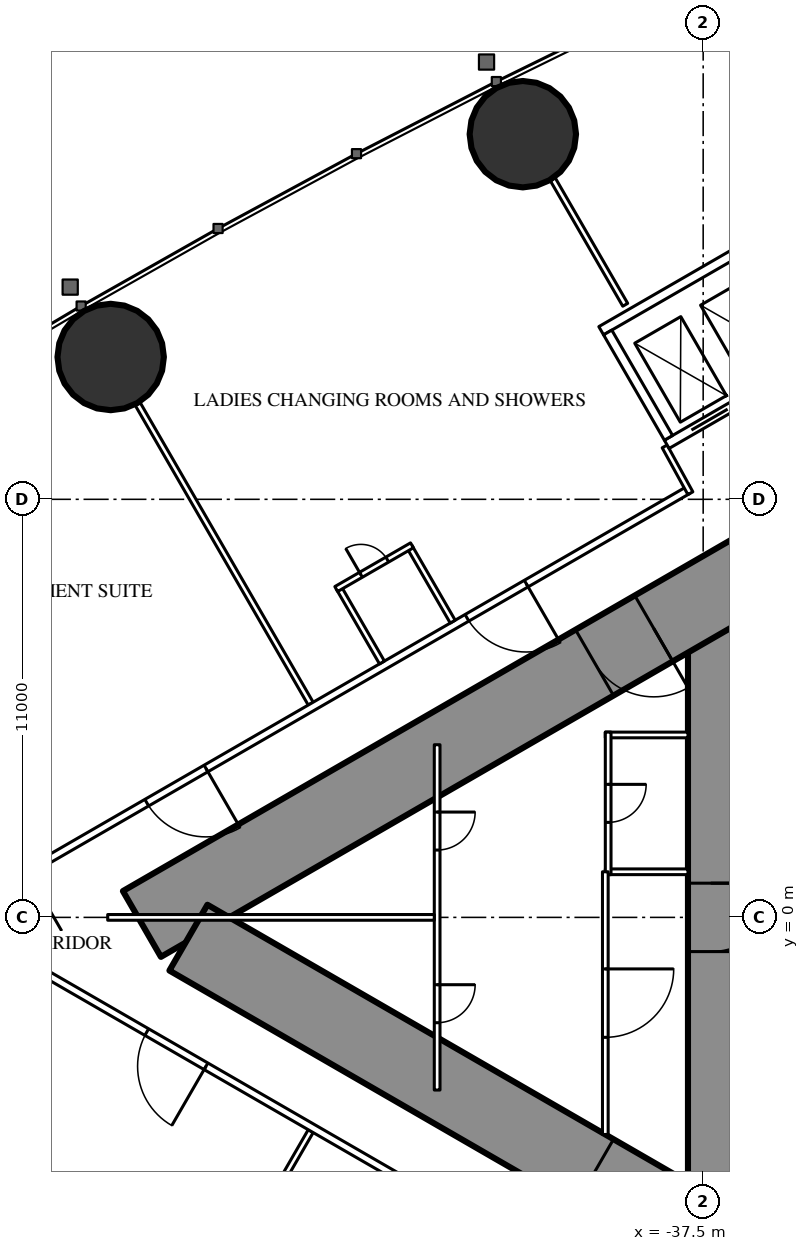
"""IFC4 building model, lengths in metres.
Left out: names, types, materials, properties, quantities, classifications, styles, units other than length and angle.
Written with IfcOpenShell. Run it as: python <this file> out.ifc"""

import sys

from ifc_helpers import new_model, si_unit, direction, frame, frame_2d, origin, origin_2d, place, context, subcontext, project, spatial, rectangle, hollow_circle, extrude, element, fill, save


model = new_model("IFC4")
c1 = context("Model", 3, precision=1e-05, world=origin(), true_north=direction((0.0, 1.0)))
c2 = subcontext(c1, "Body", "Model", "MODEL_VIEW")
j1 = project(units=[si_unit("LENGTHUNIT", "METRE"), si_unit("PLANEANGLEUNIT", "RADIAN")], contexts=[c1])
p1 = place(None, origin())
s1 = spatial("IfcSite", under=j1, at=p1, CompositionType="ELEMENT")
p2 = place(p1, origin())
s2 = spatial("IfcBuilding", under=s1, at=p2, CompositionType="ELEMENT")
p3 = place(p2, frame((0.0, 0.0, 12.6)))
s3 = spatial("IfcBuildingStorey", under=s2, at=p3, CompositionType="ELEMENT", Elevation=12.6)
for number, where, z_axis, x_axis in (
    (1, (-42.245, 20.607, 0.0), (0.0, 0.0, 1.0), (1.0, 0.0, 0.0)),
    (2, (-53.09, 14.745, 0.0), (0.0, 0.0, 1.0), (1.0, 0.0, 0.0)),
):
    element("IfcColumn", number, at=place(p3, frame(where, z_axis=z_axis, x_axis=x_axis)), inside=s3, PredefinedType="COLUMN", context=c2, shape_type="SweptSolid", body=[
        extrude(hollow_circle(Radius=1.4, WallThickness=0.12, at=origin_2d()), origin(), (0.0, 0.0, 1.0), 5.4),
    ])
p4 = place(p3, frame((-37.3, 8.6, 0.0), z_axis=(0.0, 0.0, 1.0), x_axis=(0.0, -1.0, 0.0)))
e3 = element("IfcWall", 3, at=p4, inside=s3, PredefinedType="SHEAR", context=c2, shape_type="SweptSolid", body=[
    extrude(rectangle(XDim=17.2, YDim=1.2, at=frame_2d((8.6, 0.0))), origin(), (0.0, 0.0, 1.0), 5.4),
])
p5 = place(p4, frame((7.7, 0.0, 0.0)))
e4 = element("IfcOpeningElement", 4, at=p5, cuts=e3, PredefinedType="OPENING", context=c2, shape_type="SweptSolid", body=[
    extrude(rectangle(XDim=1.8, YDim=2.2, at=frame_2d((0.9, 1.1))), frame((0.0, 0.61, 0.0), z_axis=(0.0, -1.0, 0.0), x_axis=(1.0, 0.0, 0.0)), (0.0, 0.0, 1.0), 1.22),
])
p6 = place(p3, frame((-27.2, 14.3, 0.0), z_axis=(0.0, 0.0, 1.0), x_axis=(-0.866026593062, -0.499997940104, 0.0)))
e5 = element("IfcWall", 5, at=p6, inside=s3, PredefinedType="SHEAR", context=c2, shape_type="SweptSolid", body=[
    extrude(rectangle(XDim=28.946, YDim=2.0, at=frame_2d((14.473, 0.0))), origin(), (0.0, 0.0, 1.0), 5.4),
])
p7 = place(p6, frame((4.6, 0.0, 0.0)))
e6 = element("IfcOpeningElement", 6, at=p7, cuts=e5, PredefinedType="OPENING", context=c2, shape_type="SweptSolid", body=[
    extrude(rectangle(XDim=1.0, YDim=2.2, at=frame_2d((0.5, 1.1))), frame((0.0, 1.01, 0.0), z_axis=(0.0, -1.0, 0.0), x_axis=(1.0, 0.0, 0.0)), (0.0, 0.0, 1.0), 2.02),
])
p8 = place(p6, frame((13.395, 0.0, 0.0)))
e7 = element("IfcOpeningElement", 7, at=p8, cuts=e5, PredefinedType="OPENING", context=c2, shape_type="SweptSolid", body=[
    extrude(rectangle(XDim=1.8, YDim=2.2, at=frame_2d((0.9, 1.1))), frame((0.0, 1.01, 0.0), z_axis=(0.0, -1.0, 0.0), x_axis=(1.0, 0.0, 0.0)), (0.0, 0.0, 1.0), 2.02),
])
p9 = place(p3, frame((-27.2, -14.3, 0.0), z_axis=(0.0, 0.0, 1.0), x_axis=(-0.866024044937, 0.500002353585, 0.0)))
e8 = element("IfcWall", 8, at=p9, inside=s3, PredefinedType="SHEAR", context=c2, shape_type="SweptSolid", body=[
    extrude(rectangle(XDim=27.533, YDim=2.0, at=frame_2d((13.767, 0.0))), origin(), (0.0, 0.0, 1.0), 5.4),
])
p10 = place(p9, frame((4.6, 0.0, 0.0)))
e9 = element("IfcOpeningElement", 9, at=p10, cuts=e8, PredefinedType="OPENING", context=c2, shape_type="SweptSolid", body=[
    extrude(rectangle(XDim=1.0, YDim=2.2, at=frame_2d((0.5, 1.1))), frame((0.0, 1.01, 0.0), z_axis=(0.0, -1.0, 0.0), x_axis=(1.0, 0.0, 0.0)), (0.0, 0.0, 1.0), 2.02),
])
p11 = place(p9, frame((13.395, 0.0, 0.0)))
e10 = element("IfcOpeningElement", 10, at=p11, cuts=e8, PredefinedType="OPENING", context=c2, shape_type="SweptSolid", body=[
    extrude(rectangle(XDim=1.8, YDim=2.2, at=frame_2d((0.9, 1.1))), frame((0.0, 1.01, 0.0), z_axis=(0.0, -1.0, 0.0), x_axis=(1.0, 0.0, 0.0)), (0.0, 0.0, 1.0), 2.02),
])
for number, where, z_axis, x_axis in (
    (11, (-47.827, 5.624, 0.0), (0.0, 0.0, 1.0), (-0.5, 0.866, 0.0)),
    (12, (-47.827, -5.624, 0.0), (0.0, 0.0, 1.0), (-0.5, -0.866, 0.0)),
):
    element("IfcWall", number, at=place(p3, frame(where, z_axis=z_axis, x_axis=x_axis)), inside=s3, PredefinedType="PARTITIONING", context=c2, shape_type="SweptSolid", body=[
        extrude(rectangle(XDim=9.11, YDim=0.15, at=frame_2d((4.555, 0.0))), origin(), (0.0, 0.0, 1.0), 4.15),
    ])
p12 = place(p3, frame((-39.551, 16.119, 0.0), z_axis=(0.0, 0.0, 1.0), x_axis=(-0.500014214979, 0.866017196607, 0.0)))
e13 = element("IfcWall", 13, at=p12, inside=s3, PredefinedType="PARTITIONING", context=c2, shape_type="SweptSolid", body=[
    extrude(rectangle(XDim=3.815, YDim=0.15, at=frame_2d((1.907, 0.0))), origin(), (0.0, 0.0, 1.0), 5.15),
])
p13 = place(p3, frame((-37.9, 11.24, 0.0), z_axis=(0.0, 0.0, 1.0), x_axis=(-0.866022995118, -0.50000417191, 0.0)))
e14 = element("IfcWall", 14, at=p13, inside=s3, PredefinedType="PARTITIONING", context=c2, shape_type="SweptSolid", body=[
    extrude(rectangle(XDim=22.48, YDim=0.2, at=frame_2d((11.24, 0.0))), origin(), (0.0, 0.0, 1.0), 4.25),
])
p14 = place(p13, frame((14.644, 0.0, 0.0)))
e15 = element("IfcOpeningElement", 15, at=p14, cuts=e14, PredefinedType="OPENING", context=c2, shape_type="SweptSolid", body=[
    extrude(rectangle(XDim=1.8, YDim=2.2, at=frame_2d((0.9, 1.1))), frame((0.0, 0.11, 0.0), z_axis=(0.0, -1.0, 0.0), x_axis=(1.0, 0.0, 0.0)), (0.0, 0.0, 1.0), 0.22),
])
p15 = place(p13, frame((20.069, 0.0, 0.0)))
e16 = element("IfcOpeningElement", 16, at=p15, cuts=e14, PredefinedType="OPENING", context=c2, shape_type="SweptSolid", body=[
    extrude(rectangle(XDim=1.8, YDim=2.2, at=frame_2d((0.9, 1.1))), frame((0.0, 0.11, 0.0), z_axis=(0.0, -1.0, 0.0), x_axis=(1.0, 0.0, 0.0)), (0.0, 0.0, 1.0), 0.22),
])
p16 = place(p13, frame((4.915, 0.0, 0.0)))
e17 = element("IfcOpeningElement", 17, at=p16, cuts=e14, PredefinedType="OPENING", context=c2, shape_type="SweptSolid", body=[
    extrude(rectangle(XDim=1.8, YDim=2.2, at=frame_2d((0.9, 1.1))), frame((0.0, 0.11, 0.0), z_axis=(0.0, -1.0, 0.0), x_axis=(1.0, 0.0, 0.0)), (0.0, 0.0, 1.0), 0.22),
])
p17 = place(p3, frame((-37.12, -11.69, 0.0), z_axis=(0.0, 0.0, 1.0), x_axis=(-0.866028803602, 0.499994111297, 0.0)))
e18 = element("IfcWall", 18, at=p17, inside=s3, PredefinedType="PARTITIONING", context=c2, shape_type="SweptSolid", body=[
    extrude(rectangle(XDim=23.26, YDim=0.2, at=frame_2d((11.63, 0.0))), origin(), (0.0, 0.0, 1.0), 4.25),
])
p18 = place(p17, frame((20.909, 0.0, 0.0)))
e19 = element("IfcOpeningElement", 19, at=p18, cuts=e18, PredefinedType="OPENING", context=c2, shape_type="SweptSolid", body=[
    extrude(rectangle(XDim=1.8, YDim=2.2, at=frame_2d((0.9, 1.1))), frame((0.0, 0.11, 0.0), z_axis=(0.0, -1.0, 0.0), x_axis=(1.0, 0.0, 0.0)), (0.0, 0.0, 1.0), 0.22),
])
p19 = place(p17, frame((15.544, 0.0, 0.0)))
e20 = element("IfcOpeningElement", 20, at=p19, cuts=e18, PredefinedType="OPENING", context=c2, shape_type="SweptSolid", body=[
    extrude(rectangle(XDim=1.8, YDim=2.2, at=frame_2d((0.9, 1.1))), frame((0.0, 0.11, 0.0), z_axis=(0.0, -1.0, 0.0), x_axis=(1.0, 0.0, 0.0)), (0.0, 0.0, 1.0), 0.22),
])
p20 = place(p17, frame((5.365, 0.0, 0.0)))
e21 = element("IfcOpeningElement", 21, at=p20, cuts=e18, PredefinedType="OPENING", context=c2, shape_type="SweptSolid", body=[
    extrude(rectangle(XDim=1.8, YDim=2.2, at=frame_2d((0.9, 1.1))), frame((0.0, 0.11, 0.0), z_axis=(0.0, -1.0, 0.0), x_axis=(1.0, 0.0, 0.0)), (0.0, 0.0, 1.0), 0.22),
])
p21 = place(p3, frame((-38.513, 12.392, 0.0), z_axis=(0.0, 0.0, 1.0), x_axis=(0.481358300093, -0.876523922624, 0.0)))
e22 = element("IfcWall", 22, at=p21, inside=s3, PredefinedType="PARTITIONING", context=c2, shape_type="SweptSolid", body=[
    extrude(rectangle(XDim=1.405, YDim=0.15, at=frame_2d((0.703, 0.0))), origin(), (0.0, 0.0, 1.0), 5.15),
])
for number, where, z_axis, x_axis in (
    (23, (-37.9, 1.2, 0.0), (0.0, 0.0, 1.0), (-1.0, 0.0, 0.0)),
    (24, (-37.9, 4.8, 0.0), (0.0, 0.0, 1.0), (-1.0, 0.0, 0.0)),
):
    element("IfcWall", number, at=place(p3, frame(where, z_axis=z_axis, x_axis=x_axis)), inside=s3, PredefinedType="PARTITIONING", context=c2, shape_type="SweptSolid", body=[
        extrude(rectangle(XDim=2.175, YDim=0.15, at=frame_2d((1.087, 0.0))), origin(), (0.0, 0.0, 1.0), 5.15),
    ])
p22 = place(p3, frame((-40.0, 4.875, 0.0), z_axis=(0.0, 0.0, 1.0), x_axis=(0.0, -1.0, 0.0)))
e25 = element("IfcWall", 25, at=p22, inside=s3, PredefinedType="PARTITIONING", context=c2, shape_type="SweptSolid", body=[
    extrude(rectangle(XDim=3.75, YDim=0.15, at=frame_2d((1.875, 0.0))), origin(), (0.0, 0.0, 1.0), 5.15),
])
p23 = place(p22, frame((1.375, 0.0, 0.0)))
e26 = element("IfcOpeningElement", 26, at=p23, cuts=e25, PredefinedType="OPENING", context=c2, shape_type="SweptSolid", body=[
    extrude(rectangle(XDim=1.0, YDim=2.2, at=frame_2d((0.5, 1.1))), frame((0.0, 0.085, 0.0), z_axis=(0.0, -1.0, 0.0), x_axis=(1.0, 0.0, 0.0)), (0.0, 0.0, 1.0), 0.17),
])
p24 = place(p3, frame((-40.075, 1.2, 0.0), z_axis=(0.0, 0.0, 1.0), x_axis=(0.0, -1.0, 0.0)))
e27 = element("IfcWall", 27, at=p24, inside=s3, PredefinedType="PARTITIONING", context=c2, shape_type="SweptSolid", body=[
    extrude(rectangle(XDim=6.912, YDim=0.15, at=frame_2d((3.456, 0.0))), origin(), (0.0, 0.0, 1.0), 5.15),
])
p25 = place(p24, frame((2.556, 0.0, 0.0)))
e28 = element("IfcOpeningElement", 28, at=p25, cuts=e27, PredefinedType="OPENING", context=c2, shape_type="SweptSolid", body=[
    extrude(rectangle(XDim=1.8, YDim=2.2, at=frame_2d((0.9, 1.1))), frame((0.0, 0.085, 0.0), z_axis=(0.0, -1.0, 0.0), x_axis=(1.0, 0.0, 0.0)), (0.0, 0.0, 1.0), 0.17),
])
p26 = place(p3, frame((-44.5, 4.543, 0.0), z_axis=(0.0, 0.0, 1.0), x_axis=(0.0, -1.0, 0.0)))
e29 = element("IfcWall", 29, at=p26, inside=s3, PredefinedType="PARTITIONING", context=c2, shape_type="SweptSolid", body=[
    extrude(rectangle(XDim=9.085, YDim=0.15, at=frame_2d((4.543, 0.0))), origin(), (0.0, 0.0, 1.0), 5.15),
])
p27 = place(p26, frame((1.771, 0.0, 0.0)))
e30 = element("IfcOpeningElement", 30, at=p27, cuts=e29, PredefinedType="OPENING", context=c2, shape_type="SweptSolid", body=[
    extrude(rectangle(XDim=1.0, YDim=2.2, at=frame_2d((0.5, 1.1))), frame((0.0, 0.085, 0.0), z_axis=(0.0, -1.0, 0.0), x_axis=(1.0, 0.0, 0.0)), (0.0, 0.0, 1.0), 0.17),
])
p28 = place(p26, frame((6.314, 0.0, 0.0)))
e31 = element("IfcOpeningElement", 31, at=p28, cuts=e29, PredefinedType="OPENING", context=c2, shape_type="SweptSolid", body=[
    extrude(rectangle(XDim=1.0, YDim=2.2, at=frame_2d((0.5, 1.1))), frame((0.0, 0.085, 0.0), z_axis=(0.0, -1.0, 0.0), x_axis=(1.0, 0.0, 0.0)), (0.0, 0.0, 1.0), 0.17),
])
p29 = place(p3, frame((-44.575, 0.0, 0.0), z_axis=(0.0, 0.0, 1.0), x_axis=(-1.0, 0.0, 0.0)))
e32 = element("IfcWall", 32, at=p29, inside=s3, PredefinedType="PARTITIONING", context=c2, shape_type="SweptSolid", body=[
    extrude(rectangle(XDim=8.593, YDim=0.15, at=frame_2d((4.297, 0.0))), origin(), (0.0, 0.0, 1.0), 4.15),
])
p30 = place(p3, frame((-44.09, 7.782, 0.0), z_axis=(0.0, 0.0, 1.0), x_axis=(-0.499982560684, 0.866035472144, 0.0)))
e33 = element("IfcWall", 33, at=p30, inside=s3, PredefinedType="PARTITIONING", context=c2, shape_type="SweptSolid", body=[
    extrude(rectangle(XDim=2.275, YDim=0.15, at=frame_2d((1.137, 0.0))), origin(), (0.0, 0.0, 1.0), 5.15),
])
p31 = place(p3, frame((-45.952, 6.707, 0.0), z_axis=(0.0, 0.0, 1.0), x_axis=(-0.500063042646, 0.865989003036, 0.0)))
e34 = element("IfcWall", 34, at=p31, inside=s3, PredefinedType="PARTITIONING", context=c2, shape_type="SweptSolid", body=[
    extrude(rectangle(XDim=2.275, YDim=0.15, at=frame_2d((1.138, 0.0))), origin(), (0.0, 0.0, 1.0), 5.15),
])
p32 = place(p3, frame((-45.163, 9.789, 0.0), z_axis=(0.0, 0.0, 1.0), x_axis=(-0.866053019151, -0.499952165731, 0.0)))
e35 = element("IfcWall", 35, at=p32, inside=s3, PredefinedType="PARTITIONING", context=c2, shape_type="SweptSolid", body=[
    extrude(rectangle(XDim=2.3, YDim=0.15, at=frame_2d((1.15, 0.0))), origin(), (0.0, 0.0, 1.0), 5.15),
])
p33 = place(p32, frame((0.75, 0.0, 0.0)))
e36 = element("IfcOpeningElement", 36, at=p33, cuts=e35, PredefinedType="OPENING", context=c2, shape_type="SweptSolid", body=[
    extrude(rectangle(XDim=0.8, YDim=2.2, at=frame_2d((0.4, 1.1))), frame((0.0, 0.085, 0.0), z_axis=(0.0, -1.0, 0.0), x_axis=(1.0, 0.0, 0.0)), (0.0, 0.0, 1.0), 0.17),
])
p34 = place(p3, frame((-31.01, 16.747, 0.0), z_axis=(0.0, 0.0, 1.0), x_axis=(-0.866028165386, -0.499995216735, 0.0)))
e37 = element("IfcWall", 37, at=p34, inside=s3, PredefinedType="PARTITIONING", context=c2, shape_type="SweptSolid", body=[
    extrude(rectangle(XDim=8.6, YDim=0.25, at=frame_2d((4.3, 0.0))), origin(), (0.0, 0.0, 1.0), 5.15),
])
p35 = place(p34, frame((0.75, 0.0, 0.0)))
e38 = element("IfcOpeningElement", 38, at=p35, cuts=e37, PredefinedType="OPENING", context=c2, shape_type="SweptSolid", body=[
    extrude(rectangle(XDim=1.1, YDim=2.2, at=frame_2d((0.55, 1.1))), frame((0.0, 0.135, 0.0), z_axis=(0.0, -1.0, 0.0), x_axis=(1.0, 0.0, 0.0)), (0.0, 0.0, 1.0), 0.27),
])
p36 = place(p34, frame((2.75, 0.0, 0.0)))
e39 = element("IfcOpeningElement", 39, at=p36, cuts=e37, PredefinedType="OPENING", context=c2, shape_type="SweptSolid", body=[
    extrude(rectangle(XDim=1.1, YDim=2.2, at=frame_2d((0.55, 1.1))), frame((0.0, 0.135, 0.0), z_axis=(0.0, -1.0, 0.0), x_axis=(1.0, 0.0, 0.0)), (0.0, 0.0, 1.0), 0.27),
])
p37 = place(p34, frame((4.75, 0.0, 0.0)))
e40 = element("IfcOpeningElement", 40, at=p37, cuts=e37, PredefinedType="OPENING", context=c2, shape_type="SweptSolid", body=[
    extrude(rectangle(XDim=1.1, YDim=2.2, at=frame_2d((0.55, 1.1))), frame((0.0, 0.135, 0.0), z_axis=(0.0, -1.0, 0.0), x_axis=(1.0, 0.0, 0.0)), (0.0, 0.0, 1.0), 0.27),
])
p38 = place(p34, frame((6.75, 0.0, 0.0)))
e41 = element("IfcOpeningElement", 41, at=p38, cuts=e37, PredefinedType="OPENING", context=c2, shape_type="SweptSolid", body=[
    extrude(rectangle(XDim=1.1, YDim=2.2, at=frame_2d((0.55, 1.1))), frame((0.0, 0.135, 0.0), z_axis=(0.0, -1.0, 0.0), x_axis=(1.0, 0.0, 0.0)), (0.0, 0.0, 1.0), 0.27),
])
p39 = place(p3, frame((-32.736, 19.736, 0.0), z_axis=(0.0, 0.0, 1.0), x_axis=(-0.866028165386, -0.499995216735, 0.0)))
e42 = element("IfcWall", 42, at=p39, inside=s3, PredefinedType="PARTITIONING", context=c2, shape_type="SweptSolid", body=[
    extrude(rectangle(XDim=8.6, YDim=0.25, at=frame_2d((4.3, 0.0))), origin(), (0.0, 0.0, 1.0), 5.15),
])
p40 = place(p3, frame((-38.413, 12.618, 0.0), z_axis=(0.0, 0.0, 1.0), x_axis=(-0.499872130319, 0.866099216793, 0.0)))
e43 = element("IfcWall", 43, at=p40, inside=s3, PredefinedType="PARTITIONING", context=c2, shape_type="SweptSolid", body=[
    extrude(rectangle(XDim=3.2, YDim=0.25, at=frame_2d((1.6, 0.0))), origin(), (0.0, 0.0, 1.0), 5.15),
])
p41 = place(p14, origin())
e44 = element("IfcDoor", 44, at=p41, inside=s3, OperationType="DOUBLE_DOOR_SINGLE_SWING", PredefinedType="DOOR", context=c2, shape_type="SweptSolid", body=[
    extrude(rectangle(XDim=1.8, YDim=2.2, at=frame_2d((0.9, 1.1))), frame((0.0, 0.025, 0.0), z_axis=(0.0, -1.0, 0.0), x_axis=(1.0, 0.0, 0.0)), (0.0, 0.0, 1.0), 0.05),
])
fill(e15, e44)
p42 = place(p19, origin())
e45 = element("IfcDoor", 45, at=p42, inside=s3, OperationType="DOUBLE_DOOR_SINGLE_SWING", PredefinedType="DOOR", context=c2, shape_type="SweptSolid", body=[
    extrude(rectangle(XDim=1.8, YDim=2.2, at=frame_2d((0.9, 1.1))), frame((0.0, 0.025, 0.0), z_axis=(0.0, -1.0, 0.0), x_axis=(1.0, 0.0, 0.0)), (0.0, 0.0, 1.0), 0.05),
])
fill(e20, e45)
p43 = place(p16, origin())
e46 = element("IfcDoor", 46, at=p43, inside=s3, OperationType="DOUBLE_DOOR_SINGLE_SWING", PredefinedType="DOOR", context=c2, shape_type="SweptSolid", body=[
    extrude(rectangle(XDim=1.8, YDim=2.2, at=frame_2d((0.9, 1.1))), frame((0.0, 0.025, 0.0), z_axis=(0.0, -1.0, 0.0), x_axis=(1.0, 0.0, 0.0)), (0.0, 0.0, 1.0), 0.05),
])
fill(e17, e46)
p44 = place(p23, origin())
e47 = element("IfcDoor", 47, at=p44, inside=s3, OperationType="SINGLE_SWING_LEFT", PredefinedType="DOOR", context=c2, shape_type="SweptSolid", body=[
    extrude(rectangle(XDim=1.0, YDim=2.2, at=frame_2d((0.5, 1.1))), frame((0.0, 0.025, 0.0), z_axis=(0.0, -1.0, 0.0), x_axis=(1.0, 0.0, 0.0)), (0.0, 0.0, 1.0), 0.05),
])
fill(e26, e47)
p45 = place(p25, origin())
e48 = element("IfcDoor", 48, at=p45, inside=s3, OperationType="DOUBLE_DOOR_SINGLE_SWING", PredefinedType="DOOR", context=c2, shape_type="SweptSolid", body=[
    extrude(rectangle(XDim=1.8, YDim=2.2, at=frame_2d((0.9, 1.1))), frame((0.0, 0.025, 0.0), z_axis=(0.0, -1.0, 0.0), x_axis=(1.0, 0.0, 0.0)), (0.0, 0.0, 1.0), 0.05),
])
fill(e28, e48)
p46 = place(p27, origin())
e49 = element("IfcDoor", 49, at=p46, inside=s3, OperationType="SINGLE_SWING_LEFT", PredefinedType="DOOR", context=c2, shape_type="SweptSolid", body=[
    extrude(rectangle(XDim=1.0, YDim=2.2, at=frame_2d((0.5, 1.1))), frame((0.0, 0.025, 0.0), z_axis=(0.0, -1.0, 0.0), x_axis=(1.0, 0.0, 0.0)), (0.0, 0.0, 1.0), 0.05),
])
fill(e30, e49)
p47 = place(p28, origin())
e50 = element("IfcDoor", 50, at=p47, inside=s3, OperationType="SINGLE_SWING_LEFT", PredefinedType="DOOR", context=c2, shape_type="SweptSolid", body=[
    extrude(rectangle(XDim=1.0, YDim=2.2, at=frame_2d((0.5, 1.1))), frame((0.0, 0.025, 0.0), z_axis=(0.0, -1.0, 0.0), x_axis=(1.0, 0.0, 0.0)), (0.0, 0.0, 1.0), 0.05),
])
fill(e31, e50)
p48 = place(p8, origin())
e51 = element("IfcDoor", 51, at=p48, inside=s3, OperationType="DOUBLE_DOOR_SINGLE_SWING", PredefinedType="DOOR", context=c2, shape_type="SweptSolid", body=[
    extrude(rectangle(XDim=1.8, YDim=2.2, at=frame_2d((0.9, 1.1))), frame((0.0, 0.025, 0.0), z_axis=(0.0, -1.0, 0.0), x_axis=(1.0, 0.0, 0.0)), (0.0, 0.0, 1.0), 0.05),
])
fill(e7, e51)
p49 = place(p5, origin())
e52 = element("IfcDoor", 52, at=p49, inside=s3, OperationType="DOUBLE_DOOR_SINGLE_SWING", PredefinedType="DOOR", context=c2, shape_type="SweptSolid", body=[
    extrude(rectangle(XDim=1.8, YDim=2.2, at=frame_2d((0.9, 1.1))), frame((0.0, 0.025, 0.0), z_axis=(0.0, -1.0, 0.0), x_axis=(1.0, 0.0, 0.0)), (0.0, 0.0, 1.0), 0.05),
])
fill(e4, e52)
p50 = place(p33, origin())
e53 = element("IfcDoor", 53, at=p50, inside=s3, OperationType="SINGLE_SWING_RIGHT", PredefinedType="DOOR", context=c2, shape_type="SweptSolid", body=[
    extrude(rectangle(XDim=0.8, YDim=2.2, at=frame_2d((0.4, 1.1))), frame((0.0, 0.025, 0.0), z_axis=(0.0, -1.0, 0.0), x_axis=(1.0, 0.0, 0.0)), (0.0, 0.0, 1.0), 0.05),
])
fill(e36, e53)
p51 = place(p38, origin())
e54 = element("IfcDoor", 54, at=p51, inside=s3, OperationType="DOUBLE_DOOR_SLIDING", PredefinedType="USERDEFINED", context=c2, shape_type="SweptSolid", body=[
    extrude(rectangle(XDim=1.1, YDim=2.2, at=frame_2d((0.55, 1.1))), frame((0.0, 0.025, 0.0), z_axis=(0.0, -1.0, 0.0), x_axis=(1.0, 0.0, 0.0)), (0.0, 0.0, 1.0), 0.05),
])
fill(e41, e54)
save(model, sys.argv[1])
